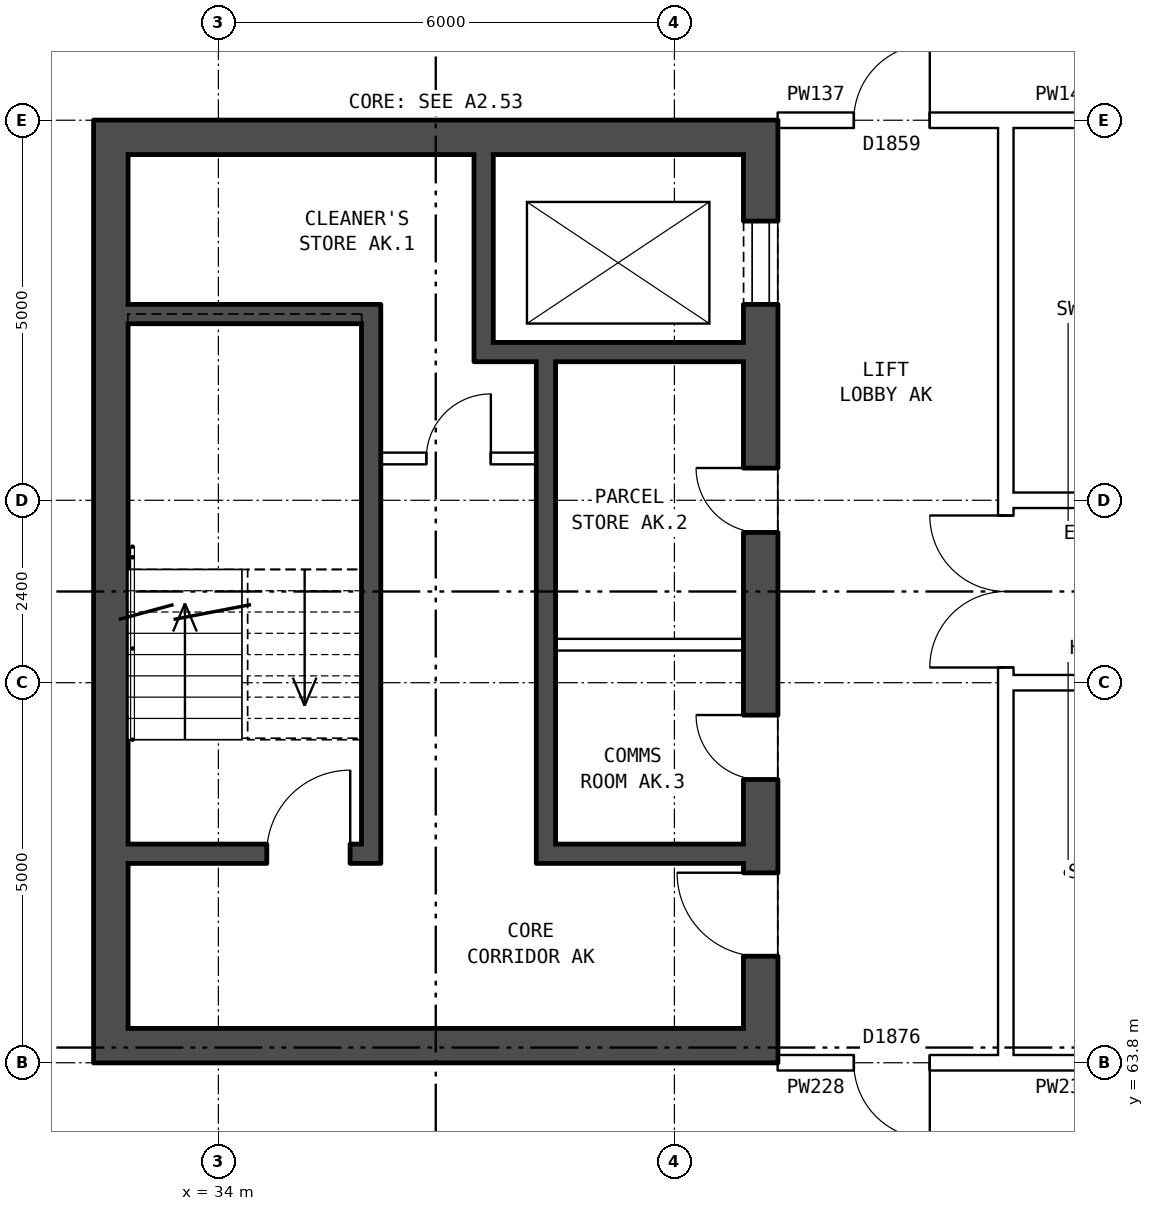
"""IFC4 building model, lengths in metres.
Left out: names, types, materials, properties, quantities, classifications, styles, units other than length and angle.
Written with IfcOpenShell. Run it as: python <this file> out.ifc"""

import sys

from ifc_helpers import new_model, si_unit, direction, frame, frame_2d, origin, place, context, subcontext, project, spatial, rectangle, extrude, element, fill, save


model = new_model("IFC4")
c1 = context("Model", 3, precision=1e-05, world=origin(), true_north=direction((0.0, 1.0)))
c2 = subcontext(c1, "Body", "Model", "MODEL_VIEW")
j1 = project(units=[si_unit("LENGTHUNIT", "METRE"), si_unit("PLANEANGLEUNIT", "RADIAN")], contexts=[c1])
p1 = place(None, origin())
s1 = spatial("IfcSite", under=j1, at=p1, CompositionType="ELEMENT")
p2 = place(p1, origin())
s2 = spatial("IfcBuilding", under=s1, at=p2, CompositionType="ELEMENT")
p3 = place(p2, frame((0.0, 0.0, 185.1)))
s3 = spatial("IfcBuildingStorey", under=s2, at=p3, CompositionType="ELEMENT", Elevation=185.1)
p4 = place(p3, frame((41.135, 76.2, 0.0), z_axis=(0.0, 0.0, 1.0), x_axis=(0.0, -1.0, 0.0)))
e1 = element("IfcWall", 1, at=p4, inside=s3, PredefinedType="SHEAR", context=c2, shape_type="SweptSolid", body=[
    extrude(rectangle(XDim=12.4, YDim=0.45, at=frame_2d((6.2, 0.0))), origin(), (0.0, 0.0, 1.0), 2.85),
])
p5 = place(p4, frame((1.325, 0.0, 0.0)))
e2 = element("IfcOpeningElement", 2, at=p5, cuts=e1, PredefinedType="OPENING", context=c2, shape_type="SweptSolid", body=[
    extrude(rectangle(XDim=1.1, YDim=2.1, at=frame_2d((0.55, 1.05))), frame((0.0, 0.235, 0.0), z_axis=(0.0, -1.0, 0.0), x_axis=(1.0, 0.0, 0.0)), (0.0, 0.0, 1.0), 0.47),
])
p6 = place(p4, frame((4.575, 0.0, 0.0)))
e3 = element("IfcOpeningElement", 3, at=p6, cuts=e1, PredefinedType="OPENING", context=c2, shape_type="SweptSolid", body=[
    extrude(rectangle(XDim=0.85, YDim=2.1, at=frame_2d((0.425, 1.05))), frame((0.0, 0.235, 0.0), z_axis=(0.0, -1.0, 0.0), x_axis=(1.0, 0.0, 0.0)), (0.0, 0.0, 1.0), 0.47),
])
p7 = place(p4, frame((7.825, 0.0, 0.0)))
e4 = element("IfcOpeningElement", 4, at=p7, cuts=e1, PredefinedType="OPENING", context=c2, shape_type="SweptSolid", body=[
    extrude(rectangle(XDim=0.85, YDim=2.1, at=frame_2d((0.425, 1.05))), frame((0.0, 0.235, 0.0), z_axis=(0.0, -1.0, 0.0), x_axis=(1.0, 0.0, 0.0)), (0.0, 0.0, 1.0), 0.47),
])
p8 = place(p4, frame((9.9, 0.0, 0.0)))
e5 = element("IfcOpeningElement", 5, at=p8, cuts=e1, PredefinedType="OPENING", context=c2, shape_type="SweptSolid", body=[
    extrude(rectangle(XDim=1.1, YDim=2.1, at=frame_2d((0.55, 1.05))), frame((0.0, 0.235, 0.0), z_axis=(0.0, -1.0, 0.0), x_axis=(1.0, 0.0, 0.0)), (0.0, 0.0, 1.0), 0.47),
])
p9 = place(p3, frame((32.585, 76.2, 0.0), z_axis=(0.0, 0.0, 1.0), x_axis=(0.0, -1.0, 0.0)))
e6 = element("IfcWall", 6, at=p9, inside=s3, PredefinedType="SHEAR", context=c2, shape_type="SweptSolid", body=[
    extrude(rectangle(XDim=12.4, YDim=0.45, at=frame_2d((6.2, 0.0))), origin(), (0.0, 0.0, 1.0), 2.85),
])
for number, where, z_axis, x_axis in (
    (7, (40.91, 75.975, 0.0), (0.0, 0.0, 1.0), (-1.0, 0.0, 0.0)),
    (8, (40.91, 64.025, 0.0), (0.0, 0.0, 1.0), (-1.0, 0.0, 0.0)),
):
    element("IfcWall", number, at=place(p3, frame(where, z_axis=z_axis, x_axis=x_axis)), inside=s3, PredefinedType="SHEAR", context=c2, shape_type="SweptSolid", body=[
        extrude(rectangle(XDim=8.1, YDim=0.45, at=frame_2d((4.05, 0.0))), origin(), (0.0, 0.0, 1.0), 2.85),
    ])
p10 = place(p3, frame((35.885, 73.65, 0.0), z_axis=(0.0, 0.0, 1.0), x_axis=(-1.0, 0.0, 0.0)))
e9 = element("IfcWall", 9, at=p10, inside=s3, PredefinedType="SHEAR", context=c2, shape_type="SweptSolid", body=[
    extrude(rectangle(XDim=3.075, YDim=0.25, at=frame_2d((1.538, 0.0))), origin(), (0.0, 0.0, 1.0), 2.85),
])
p11 = place(p3, frame((40.91, 73.15, 0.0), z_axis=(0.0, 0.0, 1.0), x_axis=(-1.0, 0.0, 0.0)))
e10 = element("IfcWall", 10, at=p11, inside=s3, PredefinedType="SHEAR", context=c2, shape_type="SweptSolid", body=[
    extrude(rectangle(XDim=3.545, YDim=0.25, at=frame_2d((1.772, 0.0))), origin(), (0.0, 0.0, 1.0), 2.85),
])
p12 = place(p3, frame((38.185, 71.75, 0.0), z_axis=(0.0, 0.0, 1.0), x_axis=(-1.0, 0.0, 0.0)))
e11 = element("IfcWall", 11, at=p12, inside=s3, PredefinedType="PARTITIONING", context=c2, shape_type="SweptSolid", body=[
    extrude(rectangle(XDim=2.05, YDim=0.15, at=frame_2d((1.025, 0.0))), origin(), (0.0, 0.0, 1.0), 2.85),
])
p13 = place(p12, frame((0.6, 0.0, 0.0)))
e12 = element("IfcOpeningElement", 12, at=p13, cuts=e11, PredefinedType="OPENING", context=c2, shape_type="SweptSolid", body=[
    extrude(rectangle(XDim=0.85, YDim=2.1, at=frame_2d((0.425, 1.05))), frame((0.0, 0.085, 0.0), z_axis=(0.0, -1.0, 0.0), x_axis=(1.0, 0.0, 0.0)), (0.0, 0.0, 1.0), 0.17),
])
p14 = place(p3, frame((40.91, 69.3, 0.0), z_axis=(0.0, 0.0, 1.0), x_axis=(-1.0, 0.0, 0.0)))
e13 = element("IfcWall", 13, at=p14, inside=s3, PredefinedType="PARTITIONING", context=c2, shape_type="SweptSolid", body=[
    extrude(rectangle(XDim=2.475, YDim=0.15, at=frame_2d((1.237, 0.0))), origin(), (0.0, 0.0, 1.0), 2.85),
])
p15 = place(p3, frame((40.91, 66.55, 0.0), z_axis=(0.0, 0.0, 1.0), x_axis=(-1.0, 0.0, 0.0)))
e14 = element("IfcWall", 14, at=p15, inside=s3, PredefinedType="SHEAR", context=c2, shape_type="SweptSolid", body=[
    extrude(rectangle(XDim=2.475, YDim=0.25, at=frame_2d((1.237, 0.0))), origin(), (0.0, 0.0, 1.0), 2.85),
])
p16 = place(p3, frame((35.885, 66.55, 0.0), z_axis=(0.0, 0.0, 1.0), x_axis=(-1.0, 0.0, 0.0)))
e15 = element("IfcWall", 15, at=p16, inside=s3, PredefinedType="SHEAR", context=c2, shape_type="SweptSolid", body=[
    extrude(rectangle(XDim=3.075, YDim=0.25, at=frame_2d((1.538, 0.0))), origin(), (0.0, 0.0, 1.0), 2.85),
])
p17 = place(p16, frame((0.15, 0.0, 0.0)))
e16 = element("IfcOpeningElement", 16, at=p17, cuts=e15, PredefinedType="OPENING", context=c2, shape_type="SweptSolid", body=[
    extrude(rectangle(XDim=1.1, YDim=2.1, at=frame_2d((0.55, 1.05))), frame((0.0, 0.135, 0.0), z_axis=(0.0, -1.0, 0.0), x_axis=(1.0, 0.0, 0.0)), (0.0, 0.0, 1.0), 0.27),
])
p18 = place(p3, frame((38.31, 73.025, 0.0), z_axis=(0.0, 0.0, 1.0), x_axis=(0.0, -1.0, 0.0)))
e17 = element("IfcWall", 17, at=p18, inside=s3, PredefinedType="SHEAR", context=c2, shape_type="SweptSolid", body=[
    extrude(rectangle(XDim=6.6, YDim=0.25, at=frame_2d((3.3, 0.0))), origin(), (0.0, 0.0, 1.0), 2.85),
])
p19 = place(p3, frame((37.49, 75.75, 0.0), z_axis=(0.0, 0.0, 1.0), x_axis=(0.0, -1.0, 0.0)))
e18 = element("IfcWall", 18, at=p19, inside=s3, PredefinedType="SHEAR", context=c2, shape_type="SweptSolid", body=[
    extrude(rectangle(XDim=2.475, YDim=0.25, at=frame_2d((1.238, 0.0))), origin(), (0.0, 0.0, 1.0), 2.85),
])
p20 = place(p3, frame((36.01, 73.775, 0.0), z_axis=(0.0, 0.0, 1.0), x_axis=(0.0, -1.0, 0.0)))
e19 = element("IfcWall", 19, at=p20, inside=s3, PredefinedType="SHEAR", context=c2, shape_type="SweptSolid", body=[
    extrude(rectangle(XDim=7.35, YDim=0.25, at=frame_2d((3.675, 0.0))), origin(), (0.0, 0.0, 1.0), 2.85),
])
p21 = place(p3, frame((44.36, 63.9, 0.0), z_axis=(0.0, 0.0, 1.0), x_axis=(0.0, 1.0, 0.0)))
e20 = element("IfcWall", 20, at=p21, inside=s3, PredefinedType="PARTITIONING", context=c2, shape_type="SweptSolid", body=[
    extrude(rectangle(XDim=12.2, YDim=0.2, at=frame_2d((6.1, 0.0))), origin(), (0.0, 0.0, 1.0), 2.85),
])
p22 = place(p21, frame((5.1, 0.0, 0.0)))
e21 = element("IfcOpeningElement", 21, at=p22, cuts=e20, PredefinedType="OPENING", context=c2, shape_type="SweptSolid", body=[
    extrude(rectangle(XDim=2.0, YDim=2.1, at=frame_2d((1.0, 1.05))), frame((0.0, 0.11, 0.0), z_axis=(0.0, -1.0, 0.0), x_axis=(1.0, 0.0, 0.0)), (0.0, 0.0, 1.0), 0.22),
])
p23 = place(p3, frame((41.36, 63.8, 0.0), z_axis=(0.0, 0.0, 1.0), x_axis=(1.0, 0.0, 0.0)))
e22 = element("IfcWall", 22, at=p23, inside=s3, PredefinedType="PARTITIONING", context=c2, shape_type="SweptSolid", body=[
    extrude(rectangle(XDim=3.0, YDim=0.2, at=frame_2d((1.5, 0.0))), origin(), (0.0, 0.0, 1.0), 2.85),
])
p24 = place(p23, frame((1.0, 0.0, 0.0)))
e23 = element("IfcOpeningElement", 23, at=p24, cuts=e22, PredefinedType="OPENING", context=c2, shape_type="SweptSolid", body=[
    extrude(rectangle(XDim=1.0, YDim=2.1, at=frame_2d((0.5, 1.05))), frame((0.0, 0.11, 0.0), z_axis=(0.0, -1.0, 0.0), x_axis=(1.0, 0.0, 0.0)), (0.0, 0.0, 1.0), 0.22),
])
p25 = place(p3, frame((44.36, 63.8, 0.0), z_axis=(0.0, 0.0, 1.0), x_axis=(1.0, 0.0, 0.0)))
e24 = element("IfcWall", 24, at=p25, inside=s3, PredefinedType="PARTITIONING", context=c2, shape_type="SweptSolid", body=[
    extrude(rectangle(XDim=1.54, YDim=0.2, at=frame_2d((0.77, 0.0))), origin(), (0.0, 0.0, 1.0), 2.85),
])
p26 = place(p3, frame((44.36, 68.8, 0.0), z_axis=(0.0, 0.0, 1.0), x_axis=(1.0, 0.0, 0.0)))
e25 = element("IfcWall", 25, at=p26, inside=s3, PredefinedType="PARTITIONING", context=c2, shape_type="SweptSolid", body=[
    extrude(rectangle(XDim=19.28, YDim=0.2, at=frame_2d((9.64, 0.0))), origin(), (0.0, 0.0, 1.0), 2.85),
])
p27 = place(p26, frame((14.64, 0.0, 0.0)))
e26 = element("IfcOpeningElement", 26, at=p27, cuts=e25, PredefinedType="OPENING", context=c2, shape_type="SweptSolid", body=[
    extrude(rectangle(XDim=1.0, YDim=2.1, at=frame_2d((0.5, 1.05))), frame((0.0, 0.11, 0.0), z_axis=(0.0, -1.0, 0.0), x_axis=(1.0, 0.0, 0.0)), (0.0, 0.0, 1.0), 0.22),
])
p28 = place(p26, frame((5.64, 0.0, 0.0)))
e27 = element("IfcOpeningElement", 27, at=p28, cuts=e25, PredefinedType="OPENING", context=c2, shape_type="SweptSolid", body=[
    extrude(rectangle(XDim=1.0, YDim=2.1, at=frame_2d((0.5, 1.05))), frame((0.0, 0.11, 0.0), z_axis=(0.0, -1.0, 0.0), x_axis=(1.0, 0.0, 0.0)), (0.0, 0.0, 1.0), 0.22),
])
p29 = place(p3, frame((44.36, 71.2, 0.0), z_axis=(0.0, 0.0, 1.0), x_axis=(1.0, 0.0, 0.0)))
e28 = element("IfcWall", 28, at=p29, inside=s3, PredefinedType="PARTITIONING", context=c2, shape_type="SweptSolid", body=[
    extrude(rectangle(XDim=19.28, YDim=0.2, at=frame_2d((9.64, 0.0))), origin(), (0.0, 0.0, 1.0), 2.85),
])
p30 = place(p29, frame((14.64, 0.0, 0.0)))
e29 = element("IfcOpeningElement", 29, at=p30, cuts=e28, PredefinedType="OPENING", context=c2, shape_type="SweptSolid", body=[
    extrude(rectangle(XDim=1.0, YDim=2.1, at=frame_2d((0.5, 1.05))), frame((0.0, 0.11, 0.0), z_axis=(0.0, -1.0, 0.0), x_axis=(1.0, 0.0, 0.0)), (0.0, 0.0, 1.0), 0.22),
])
p31 = place(p29, frame((5.64, 0.0, 0.0)))
e30 = element("IfcOpeningElement", 30, at=p31, cuts=e28, PredefinedType="OPENING", context=c2, shape_type="SweptSolid", body=[
    extrude(rectangle(XDim=1.0, YDim=2.1, at=frame_2d((0.5, 1.05))), frame((0.0, 0.11, 0.0), z_axis=(0.0, -1.0, 0.0), x_axis=(1.0, 0.0, 0.0)), (0.0, 0.0, 1.0), 0.22),
])
p32 = place(p3, frame((41.36, 76.2, 0.0), z_axis=(0.0, 0.0, 1.0), x_axis=(1.0, 0.0, 0.0)))
e31 = element("IfcWall", 31, at=p32, inside=s3, PredefinedType="PARTITIONING", context=c2, shape_type="SweptSolid", body=[
    extrude(rectangle(XDim=3.0, YDim=0.2, at=frame_2d((1.5, 0.0))), origin(), (0.0, 0.0, 1.0), 2.85),
])
p33 = place(p32, frame((1.0, 0.0, 0.0)))
e32 = element("IfcOpeningElement", 32, at=p33, cuts=e31, PredefinedType="OPENING", context=c2, shape_type="SweptSolid", body=[
    extrude(rectangle(XDim=1.0, YDim=2.1, at=frame_2d((0.5, 1.05))), frame((0.0, 0.11, 0.0), z_axis=(0.0, -1.0, 0.0), x_axis=(1.0, 0.0, 0.0)), (0.0, 0.0, 1.0), 0.22),
])
p34 = place(p3, frame((44.36, 76.2, 0.0), z_axis=(0.0, 0.0, 1.0), x_axis=(1.0, 0.0, 0.0)))
e33 = element("IfcWall", 33, at=p34, inside=s3, PredefinedType="PARTITIONING", context=c2, shape_type="SweptSolid", body=[
    extrude(rectangle(XDim=1.54, YDim=0.2, at=frame_2d((0.77, 0.0))), origin(), (0.0, 0.0, 1.0), 2.85),
])
p35 = place(p5, origin())
e34 = element("IfcDoor", 34, at=p35, inside=s3, OperationType="DOUBLE_DOOR_SLIDING", PredefinedType="DOOR", context=c2, shape_type="SweptSolid", body=[
    extrude(rectangle(XDim=1.1, YDim=2.1, at=frame_2d((0.55, 1.05))), frame((0.0, -0.16, 0.0), z_axis=(0.0, -1.0, 0.0), x_axis=(1.0, 0.0, 0.0)), (0.0, 0.0, 1.0), 0.05),
])
fill(e2, e34)
p36 = place(p6, frame((0.85, 0.0, 0.0), z_axis=(0.0, 0.0, 1.0), x_axis=(-1.0, 0.0, 0.0)))
e35 = element("IfcDoor", 35, at=p36, inside=s3, OperationType="SINGLE_SWING_RIGHT", PredefinedType="DOOR", context=c2, shape_type="SweptSolid", body=[
    extrude(rectangle(XDim=0.85, YDim=2.1, at=frame_2d((0.425, 1.05))), frame((0.0, 0.21, 0.0), z_axis=(0.0, -1.0, 0.0), x_axis=(1.0, 0.0, 0.0)), (0.0, 0.0, 1.0), 0.05),
])
fill(e3, e35)
p37 = place(p7, frame((0.85, 0.0, 0.0), z_axis=(0.0, 0.0, 1.0), x_axis=(-1.0, 0.0, 0.0)))
e36 = element("IfcDoor", 36, at=p37, inside=s3, OperationType="SINGLE_SWING_RIGHT", PredefinedType="DOOR", context=c2, shape_type="SweptSolid", body=[
    extrude(rectangle(XDim=0.85, YDim=2.1, at=frame_2d((0.425, 1.05))), frame((0.0, 0.21, 0.0), z_axis=(0.0, -1.0, 0.0), x_axis=(1.0, 0.0, 0.0)), (0.0, 0.0, 1.0), 0.05),
])
fill(e4, e36)
p38 = place(p8, frame((1.1, 0.0, 0.0), z_axis=(0.0, 0.0, 1.0), x_axis=(-1.0, 0.0, 0.0)))
e37 = element("IfcDoor", 37, at=p38, inside=s3, OperationType="SINGLE_SWING_RIGHT", PredefinedType="DOOR", context=c2, shape_type="SweptSolid", body=[
    extrude(rectangle(XDim=1.1, YDim=2.1, at=frame_2d((0.55, 1.05))), frame((0.0, 0.21, 0.0), z_axis=(0.0, -1.0, 0.0), x_axis=(1.0, 0.0, 0.0)), (0.0, 0.0, 1.0), 0.05),
])
fill(e5, e37)
p39 = place(p17, frame((1.1, 0.0, 0.0), z_axis=(0.0, 0.0, 1.0), x_axis=(-1.0, 0.0, 0.0)))
e38 = element("IfcDoor", 38, at=p39, inside=s3, OperationType="SINGLE_SWING_RIGHT", PredefinedType="DOOR", context=c2, shape_type="SweptSolid", body=[
    extrude(rectangle(XDim=1.1, YDim=2.1, at=frame_2d((0.55, 1.05))), frame((0.0, 0.025, 0.0), z_axis=(0.0, -1.0, 0.0), x_axis=(1.0, 0.0, 0.0)), (0.0, 0.0, 1.0), 0.05),
])
fill(e16, e38)
p40 = place(p13, frame((0.85, 0.0, 0.0), z_axis=(0.0, 0.0, 1.0), x_axis=(-1.0, 0.0, 0.0)))
e39 = element("IfcDoor", 39, at=p40, inside=s3, OperationType="SINGLE_SWING_RIGHT", PredefinedType="DOOR", context=c2, shape_type="SweptSolid", body=[
    extrude(rectangle(XDim=0.85, YDim=2.1, at=frame_2d((0.425, 1.05))), frame((0.0, 0.025, 0.0), z_axis=(0.0, -1.0, 0.0), x_axis=(1.0, 0.0, 0.0)), (0.0, 0.0, 1.0), 0.05),
])
fill(e12, e39)
p41 = place(p22, origin())
e40 = element("IfcDoor", 40, at=p41, inside=s3, OperationType="DOUBLE_DOOR_SINGLE_SWING", PredefinedType="DOOR", context=c2, shape_type="SweptSolid", body=[
    extrude(rectangle(XDim=2.0, YDim=2.1, at=frame_2d((1.0, 1.05))), frame((0.0, 0.025, 0.0), z_axis=(0.0, -1.0, 0.0), x_axis=(1.0, 0.0, 0.0)), (0.0, 0.0, 1.0), 0.05),
])
fill(e21, e40)
p42 = place(p24, frame((1.0, 0.0, 0.0), z_axis=(0.0, 0.0, 1.0), x_axis=(-1.0, 0.0, 0.0)))
e41 = element("IfcDoor", 41, at=p42, inside=s3, OperationType="SINGLE_SWING_LEFT", PredefinedType="DOOR", context=c2, shape_type="SweptSolid", body=[
    extrude(rectangle(XDim=1.0, YDim=2.1, at=frame_2d((0.5, 1.05))), frame((0.0, 0.025, 0.0), z_axis=(0.0, -1.0, 0.0), x_axis=(1.0, 0.0, 0.0)), (0.0, 0.0, 1.0), 0.05),
])
fill(e23, e41)
p43 = place(p33, origin())
e42 = element("IfcDoor", 42, at=p43, inside=s3, OperationType="SINGLE_SWING_RIGHT", PredefinedType="DOOR", context=c2, shape_type="SweptSolid", body=[
    extrude(rectangle(XDim=1.0, YDim=2.1, at=frame_2d((0.5, 1.05))), frame((0.0, 0.025, 0.0), z_axis=(0.0, -1.0, 0.0), x_axis=(1.0, 0.0, 0.0)), (0.0, 0.0, 1.0), 0.05),
])
fill(e32, e42)
save(model, sys.argv[1])
